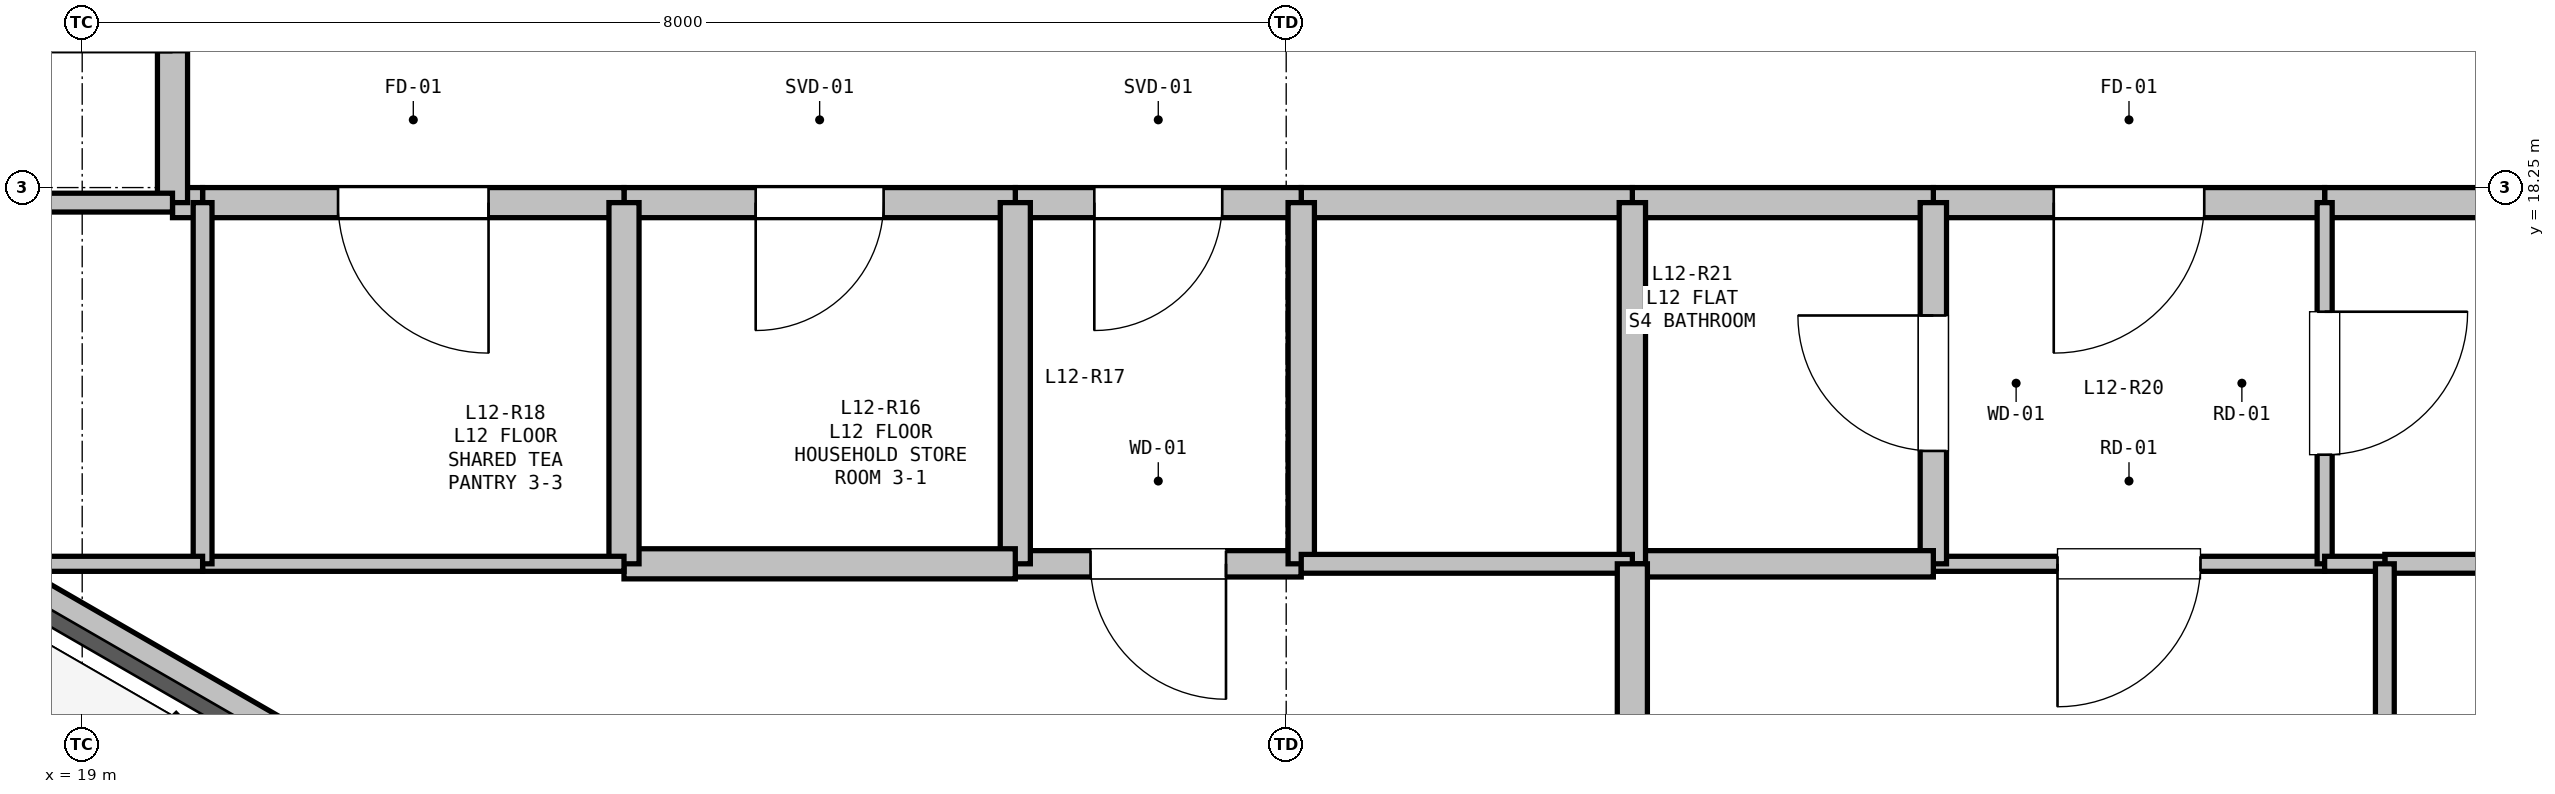
"""IFC4 building model, lengths in metres.
Left out: names, types, materials, properties, quantities, classifications, styles, units other than length and angle.
Written with IfcOpenShell. Run it as: python <this file> out.ifc"""

import sys

from ifc_helpers import new_model, si_unit, direction, frame, frame_2d, origin, place, context, subcontext, project, spatial, rectangle, extrude, element, fill, save


model = new_model("IFC4")
c1 = context("Model", 3, precision=1e-05, world=origin(), true_north=direction((0.0, 1.0)))
c2 = subcontext(c1, "Body", "Model", "MODEL_VIEW")
j1 = project(units=[si_unit("LENGTHUNIT", "METRE"), si_unit("PLANEANGLEUNIT", "RADIAN")], contexts=[c1])
p1 = place(None, origin())
s1 = spatial("IfcSite", under=j1, at=p1, CompositionType="ELEMENT")
p2 = place(p1, origin())
s2 = spatial("IfcBuilding", under=s1, at=p2, CompositionType="ELEMENT")
p3 = place(p2, frame((0.0, 0.0, 45.6)))
s3 = spatial("IfcBuildingStorey", under=s2, at=p3, CompositionType="ELEMENT", Elevation=45.6)
p4 = place(p3, frame((26.76, 10.896, 0.0), z_axis=(0.0, 0.0, 1.0), x_axis=(-0.866027351828, 0.499996625875, 0.0)))
e1 = element("IfcWall", 1, at=p4, inside=s3, PredefinedType="PARAPET", context=c2, shape_type="SweptSolid", body=[
    extrude(rectangle(XDim=11.973, YDim=0.2, at=frame_2d((5.987, 0.0))), origin(), (0.0, 0.0, 1.0), 0.2),
])
p5 = place(p3, frame((35.8, 18.15, 0.0), z_axis=(0.0, 0.0, 1.0), x_axis=(-1.0, 0.0, 0.0)))
e2 = element("IfcWall", 2, at=p5, inside=s3, PredefinedType="PARTITIONING", context=c2, shape_type="SweptSolid", body=[
    extrude(rectangle(XDim=1.9, YDim=0.2, at=frame_2d((0.95, 0.0))), origin(), (0.0, 0.0, 1.0), 3.04),
])
p6 = place(p3, frame((33.9, 18.15, 0.0), z_axis=(0.0, 0.0, 1.0), x_axis=(-1.0, 0.0, 0.0)))
e3 = element("IfcWall", 3, at=p6, inside=s3, PredefinedType="PARTITIONING", context=c2, shape_type="SweptSolid", body=[
    extrude(rectangle(XDim=2.6, YDim=0.2, at=frame_2d((1.3, 0.0))), origin(), (0.0, 0.0, 1.0), 3.04),
])
p7 = place(p6, frame((0.8, 0.0, 0.0)))
e4 = element("IfcOpeningElement", 4, at=p7, cuts=e3, PredefinedType="OPENING", context=c2, shape_type="SweptSolid", body=[
    extrude(rectangle(XDim=1.0, YDim=2.15, at=frame_2d((0.5, 1.075))), frame((0.0, 0.11, 0.0), z_axis=(0.0, -1.0, 0.0), x_axis=(1.0, 0.0, 0.0)), (0.0, 0.0, 1.0), 0.22),
])
p8 = place(p3, frame((31.3, 18.15, 0.0), z_axis=(0.0, 0.0, 1.0), x_axis=(-1.0, 0.0, 0.0)))
e5 = element("IfcWall", 5, at=p8, inside=s3, PredefinedType="PARTITIONING", context=c2, shape_type="SweptSolid", body=[
    extrude(rectangle(XDim=2.0, YDim=0.2, at=frame_2d((1.0, 0.0))), origin(), (0.0, 0.0, 1.0), 3.04),
])
p9 = place(p3, frame((29.3, 18.15, 0.0), z_axis=(0.0, 0.0, 1.0), x_axis=(-1.0, 0.0, 0.0)))
e6 = element("IfcWall", 6, at=p9, inside=s3, PredefinedType="PARTITIONING", context=c2, shape_type="SweptSolid", body=[
    extrude(rectangle(XDim=2.2, YDim=0.2, at=frame_2d((1.1, 0.0))), origin(), (0.0, 0.0, 1.0), 3.04),
])
p10 = place(p3, frame((27.1, 18.15, 0.0), z_axis=(0.0, 0.0, 1.0), x_axis=(-1.0, 0.0, 0.0)))
e7 = element("IfcWall", 7, at=p10, inside=s3, PredefinedType="PARTITIONING", context=c2, shape_type="SweptSolid", body=[
    extrude(rectangle(XDim=1.9, YDim=0.2, at=frame_2d((0.95, 0.0))), origin(), (0.0, 0.0, 1.0), 3.04),
])
p11 = place(p10, frame((0.525, 0.0, 0.0)))
e8 = element("IfcOpeningElement", 8, at=p11, cuts=e7, PredefinedType="OPENING", context=c2, shape_type="SweptSolid", body=[
    extrude(rectangle(XDim=0.85, YDim=2.1, at=frame_2d((0.425, 1.05))), frame((0.0, 0.11, 0.0), z_axis=(0.0, -1.0, 0.0), x_axis=(1.0, 0.0, 0.0)), (0.0, 0.0, 1.0), 0.22),
])
p12 = place(p3, frame((25.2, 18.15, 0.0), z_axis=(0.0, 0.0, 1.0), x_axis=(-1.0, 0.0, 0.0)))
e9 = element("IfcWall", 9, at=p12, inside=s3, PredefinedType="PARTITIONING", context=c2, shape_type="SweptSolid", body=[
    extrude(rectangle(XDim=2.6, YDim=0.2, at=frame_2d((1.3, 0.0))), origin(), (0.0, 0.0, 1.0), 2.337),
])
p13 = place(p12, frame((0.875, 0.0, 0.0)))
e10 = element("IfcOpeningElement", 10, at=p13, cuts=e9, PredefinedType="OPENING", context=c2, shape_type="SweptSolid", body=[
    extrude(rectangle(XDim=0.85, YDim=2.1, at=frame_2d((0.425, 1.05))), frame((0.0, 0.11, 0.0), z_axis=(0.0, -1.0, 0.0), x_axis=(1.0, 0.0, 0.0)), (0.0, 0.0, 1.0), 0.22),
])
p14 = place(p3, frame((22.6, 18.15, 0.0), z_axis=(0.0, 0.0, 1.0), x_axis=(-1.0, 0.0, 0.0)))
e11 = element("IfcWall", 11, at=p14, inside=s3, PredefinedType="PARTITIONING", context=c2, shape_type="SweptSolid", body=[
    extrude(rectangle(XDim=2.8, YDim=0.2, at=frame_2d((1.4, 0.0))), origin(), (0.0, 0.0, 1.0), 3.04),
])
p15 = place(p14, frame((0.9, 0.0, 0.0)))
e12 = element("IfcOpeningElement", 12, at=p15, cuts=e11, PredefinedType="OPENING", context=c2, shape_type="SweptSolid", body=[
    extrude(rectangle(XDim=1.0, YDim=2.15, at=frame_2d((0.5, 1.075))), frame((0.0, 0.11, 0.0), z_axis=(0.0, -1.0, 0.0), x_axis=(1.0, 0.0, 0.0)), (0.0, 0.0, 1.0), 0.22),
])
p16 = place(p3, frame((19.8, 18.15, 0.0), z_axis=(0.0, 0.0, 1.0), x_axis=(-1.0, 0.0, 0.0)))
e13 = element("IfcWall", 13, at=p16, inside=s3, PredefinedType="PARTITIONING", context=c2, shape_type="SweptSolid", body=[
    extrude(rectangle(XDim=0.2, YDim=0.2, at=frame_2d((0.1, 0.0))), origin(), (0.0, 0.0, 1.0), 3.04),
])
p17 = place(p3, frame((19.6, 18.15, 0.0), z_axis=(0.0, 0.0, 1.0), x_axis=(0.0, 1.0, 0.0)))
e14 = element("IfcWall", 14, at=p17, inside=s3, PredefinedType="PARTITIONING", context=c2, shape_type="SweptSolid", body=[
    extrude(rectangle(XDim=3.0, YDim=0.2, at=frame_2d((1.5, 0.0))), origin(), (0.0, 0.0, 1.0), 2.337),
])
p18 = place(p17, frame((1.0, 0.0, 0.0)))
e15 = element("IfcOpeningElement", 15, at=p18, cuts=e14, PredefinedType="OPENING", context=c2, shape_type="SweptSolid", body=[
    extrude(rectangle(XDim=1.0, YDim=2.15, at=frame_2d((0.5, 1.075))), frame((0.0, 0.11, 0.0), z_axis=(0.0, -1.0, 0.0), x_axis=(1.0, 0.0, 0.0)), (0.0, 0.0, 1.0), 0.22),
])
p19 = place(p3, frame((33.9, 15.75, 0.0), z_axis=(0.0, 0.0, 1.0), x_axis=(-1.0, 0.0, 0.0)))
e16 = element("IfcWall", 16, at=p19, inside=s3, PredefinedType="PARTITIONING", context=c2, shape_type="SweptSolid", body=[
    extrude(rectangle(XDim=2.6, YDim=0.1, at=frame_2d((1.3, 0.0))), origin(), (0.0, 0.0, 1.0), 3.04),
])
p20 = place(p19, frame((0.825, 0.0, 0.0)))
e17 = element("IfcOpeningElement", 17, at=p20, cuts=e16, PredefinedType="OPENING", context=c2, shape_type="SweptSolid", body=[
    extrude(rectangle(XDim=0.95, YDim=2.1, at=frame_2d((0.475, 1.05))), frame((0.0, 0.06, 0.0), z_axis=(0.0, -1.0, 0.0), x_axis=(1.0, 0.0, 0.0)), (0.0, 0.0, 1.0), 0.12),
])
p21 = place(p3, frame((31.3, 15.75, 0.0), z_axis=(0.0, 0.0, 1.0), x_axis=(0.0, 1.0, 0.0)))
e18 = element("IfcWall", 18, at=p21, inside=s3, PredefinedType="PLUMBINGWALL", context=c2, shape_type="SweptSolid", body=[
    extrude(rectangle(XDim=2.4, YDim=0.175, at=frame_2d((1.2, 0.0))), origin(), (0.0, 0.0, 1.0), 3.04),
])
p22 = place(p21, frame((0.75, 0.0, 0.0)))
e19 = element("IfcOpeningElement", 19, at=p22, cuts=e18, PredefinedType="OPENING", context=c2, shape_type="SweptSolid", body=[
    extrude(rectangle(XDim=0.9, YDim=2.1, at=frame_2d((0.45, 1.05))), frame((0.0, 0.097, 0.0), z_axis=(0.0, -1.0, 0.0), x_axis=(1.0, 0.0, 0.0)), (0.0, 0.0, 1.0), 0.195),
])
p23 = place(p3, frame((33.9, 18.15, 0.0), z_axis=(0.0, 0.0, 1.0), x_axis=(0.0, -1.0, 0.0)))
e20 = element("IfcWall", 20, at=p23, inside=s3, PredefinedType="PARTITIONING", context=c2, shape_type="SweptSolid", body=[
    extrude(rectangle(XDim=2.4, YDim=0.1, at=frame_2d((1.2, 0.0))), origin(), (0.0, 0.0, 1.0), 3.04),
])
p24 = place(p23, frame((0.725, 0.0, 0.0)))
e21 = element("IfcOpeningElement", 21, at=p24, cuts=e20, PredefinedType="OPENING", context=c2, shape_type="SweptSolid", body=[
    extrude(rectangle(XDim=0.95, YDim=2.1, at=frame_2d((0.475, 1.05))), frame((0.0, 0.06, 0.0), z_axis=(0.0, -1.0, 0.0), x_axis=(1.0, 0.0, 0.0)), (0.0, 0.0, 1.0), 0.12),
])
p25 = place(p3, frame((27.1, 15.75, 0.0), z_axis=(0.0, 0.0, 1.0), x_axis=(-1.0, 0.0, 0.0)))
e22 = element("IfcWall", 22, at=p25, inside=s3, PredefinedType="PLUMBINGWALL", context=c2, shape_type="SweptSolid", body=[
    extrude(rectangle(XDim=1.9, YDim=0.175, at=frame_2d((0.95, 0.0))), origin(), (0.0, 0.0, 1.0), 2.337),
])
p26 = place(p25, frame((0.5, 0.0, 0.0)))
e23 = element("IfcOpeningElement", 23, at=p26, cuts=e22, PredefinedType="OPENING", context=c2, shape_type="SweptSolid", body=[
    extrude(rectangle(XDim=0.9, YDim=2.1, at=frame_2d((0.45, 1.05))), frame((0.0, 0.097, 0.0), z_axis=(0.0, -1.0, 0.0), x_axis=(1.0, 0.0, 0.0)), (0.0, 0.0, 1.0), 0.195),
])
p27 = place(p3, frame((25.2, 15.75, 0.0), z_axis=(0.0, 0.0, 1.0), x_axis=(0.0, 1.0, 0.0)))
e24 = element("IfcWall", 24, at=p27, inside=s3, PredefinedType="PARTITIONING", context=c2, shape_type="SweptSolid", body=[
    extrude(rectangle(XDim=2.4, YDim=0.2, at=frame_2d((1.2, 0.0))), origin(), (0.0, 0.0, 1.0), 2.337),
])
p28 = place(p3, frame((27.1, 18.15, 0.0), z_axis=(0.0, 0.0, 1.0), x_axis=(0.0, -1.0, 0.0)))
e25 = element("IfcWall", 25, at=p28, inside=s3, PredefinedType="PLUMBINGWALL", context=c2, shape_type="SweptSolid", body=[
    extrude(rectangle(XDim=2.4, YDim=0.175, at=frame_2d((1.2, 0.0))), origin(), (0.0, 0.0, 1.0), 3.04),
])
p29 = place(p3, frame((31.3, 15.75, 0.0), z_axis=(0.0, 0.0, 1.0), x_axis=(-1.0, 0.0, 0.0)))
e26 = element("IfcWall", 26, at=p29, inside=s3, PredefinedType="PLUMBINGWALL", context=c2, shape_type="SweptSolid", body=[
    extrude(rectangle(XDim=2.0, YDim=0.175, at=frame_2d((1.0, 0.0))), origin(), (0.0, 0.0, 1.0), 3.04),
])
p30 = place(p3, frame((29.3, 15.75, 0.0), z_axis=(0.0, 0.0, 1.0), x_axis=(0.0, 1.0, 0.0)))
e27 = element("IfcWall", 27, at=p30, inside=s3, PredefinedType="PLUMBINGWALL", context=c2, shape_type="SweptSolid", body=[
    extrude(rectangle(XDim=2.4, YDim=0.175, at=frame_2d((1.2, 0.0))), origin(), (0.0, 0.0, 1.0), 3.04),
])
p31 = place(p3, frame((43.688, 15.75, 0.0), z_axis=(0.0, 0.0, 1.0), x_axis=(-1.0, 0.0, 0.0)))
e28 = element("IfcWall", 28, at=p31, inside=s3, PredefinedType="PARTITIONING", context=c2, shape_type="SweptSolid", body=[
    extrude(rectangle(XDim=9.388, YDim=0.125, at=frame_2d((4.694, 0.0))), origin(), (0.0, 0.0, 1.0), 2.337),
])
p32 = place(p31, frame((4.219, 0.0, 0.0)))
e29 = element("IfcOpeningElement", 29, at=p32, cuts=e28, PredefinedType="OPENING", context=c2, shape_type="SweptSolid", body=[
    extrude(rectangle(XDim=0.95, YDim=2.1, at=frame_2d((0.475, 1.05))), frame((0.0, 0.073, 0.0), z_axis=(0.0, -1.0, 0.0), x_axis=(1.0, 0.0, 0.0)), (0.0, 0.0, 1.0), 0.145),
])
p33 = place(p3, frame((34.3, 15.75, 0.0), z_axis=(0.0, 0.0, 1.0), x_axis=(-1.0, 0.0, 0.0)))
e30 = element("IfcWall", 30, at=p33, inside=s3, PredefinedType="PARTITIONING", context=c2, shape_type="SweptSolid", body=[
    extrude(rectangle(XDim=0.4, YDim=0.1, at=frame_2d((0.2, 0.0))), origin(), (0.0, 0.0, 1.0), 3.04),
])
p34 = place(p3, frame((19.6, 18.15, 0.0), z_axis=(0.0, 0.0, 1.0), x_axis=(-1.0, 0.0, 0.0)))
e31 = element("IfcWall", 31, at=p34, inside=s3, PredefinedType="PARTITIONING", context=c2, shape_type="SweptSolid", body=[
    extrude(rectangle(XDim=2.45, YDim=0.125, at=frame_2d((1.225, 0.0))), origin(), (0.0, 0.0, 1.0), 3.04),
])
p35 = place(p3, frame((25.2, 15.75, 0.0), z_axis=(0.0, 0.0, 1.0), x_axis=(-1.0, 0.0, 0.0)))
e32 = element("IfcWall", 32, at=p35, inside=s3, PredefinedType="PARTITIONING", context=c2, shape_type="SweptSolid", body=[
    extrude(rectangle(XDim=2.6, YDim=0.2, at=frame_2d((1.3, 0.0))), origin(), (0.0, 0.0, 1.0), 3.04),
])
p36 = place(p3, frame((22.6, 15.75, 0.0), z_axis=(0.0, 0.0, 1.0), x_axis=(0.0, 1.0, 0.0)))
e33 = element("IfcWall", 33, at=p36, inside=s3, PredefinedType="PARTITIONING", context=c2, shape_type="SweptSolid", body=[
    extrude(rectangle(XDim=2.4, YDim=0.2, at=frame_2d((1.2, 0.0))), origin(), (0.0, 0.0, 1.0), 3.04),
])
p37 = place(p3, frame((22.6, 15.75, 0.0), z_axis=(0.0, 0.0, 1.0), x_axis=(-1.0, 0.0, 0.0)))
e34 = element("IfcWall", 34, at=p37, inside=s3, PredefinedType="PARTITIONING", context=c2, shape_type="SweptSolid", body=[
    extrude(rectangle(XDim=2.8, YDim=0.1, at=frame_2d((1.4, 0.0))), origin(), (0.0, 0.0, 1.0), 2.65),
])
p38 = place(p3, frame((19.8, 15.75, 0.0), z_axis=(0.0, 0.0, 1.0), x_axis=(0.0, 1.0, 0.0)))
e35 = element("IfcWall", 35, at=p38, inside=s3, PredefinedType="PARTITIONING", context=c2, shape_type="SweptSolid", body=[
    extrude(rectangle(XDim=2.4, YDim=0.125, at=frame_2d((1.2, 0.0))), origin(), (0.0, 0.0, 1.0), 2.65),
])
p39 = place(p3, frame((18.418, 15.75, 0.0), z_axis=(0.0, 0.0, 1.0), x_axis=(1.0, 0.0, 0.0)))
e36 = element("IfcWall", 36, at=p39, inside=s3, PredefinedType="PARTITIONING", context=c2, shape_type="SweptSolid", body=[
    extrude(rectangle(XDim=1.382, YDim=0.1, at=frame_2d((0.691, 0.0))), origin(), (0.0, 0.0, 1.0), 2.365),
])
p40 = place(p3, frame((27.1, 15.75, 0.0), z_axis=(0.0, 0.0, 1.0), x_axis=(1.0, 0.0, 0.0)))
e37 = element("IfcWall", 37, at=p40, inside=s3, PredefinedType="PARTITIONING", context=c2, shape_type="SweptSolid", body=[
    extrude(rectangle(XDim=2.2, YDim=0.125, at=frame_2d((1.1, 0.0))), origin(), (0.0, 0.0, 1.0), 3.04),
])
p41 = place(p3, frame((29.3, 15.75, 0.0), z_axis=(0.0, 0.0, 1.0), x_axis=(0.0, -1.0, 0.0)))
e38 = element("IfcWall", 38, at=p41, inside=s3, PredefinedType="PARTITIONING", context=c2, shape_type="SweptSolid", body=[
    extrude(rectangle(XDim=6.134, YDim=0.2, at=frame_2d((3.067, 0.0))), origin(), (0.0, 0.0, 1.0), 2.337),
])
p42 = place(p3, frame((34.3, 15.75, 0.0), z_axis=(0.0, 0.0, 1.0), x_axis=(0.0, -1.0, 0.0)))
e39 = element("IfcWall", 39, at=p42, inside=s3, PredefinedType="PARTITIONING", context=c2, shape_type="SweptSolid", body=[
    extrude(rectangle(XDim=6.06, YDim=0.125, at=frame_2d((3.03, 0.0))), origin(), (0.0, 0.0, 1.0), 3.04),
])
p43 = place(p42, frame((2.555, 0.0, 0.0)))
e40 = element("IfcOpeningElement", 40, at=p43, cuts=e39, PredefinedType="OPENING", context=c2, shape_type="SweptSolid", body=[
    extrude(rectangle(XDim=0.95, YDim=2.1, at=frame_2d((0.475, 1.05))), frame((0.0, 0.073, 0.0), z_axis=(0.0, -1.0, 0.0), x_axis=(1.0, 0.0, 0.0)), (0.0, 0.0, 1.0), 0.145),
])
p44 = place(p7, origin())
e41 = element("IfcDoor", 41, at=p44, inside=s3, OperationType="SINGLE_SWING_RIGHT", PredefinedType="DOOR", context=c2, shape_type="SweptSolid", body=[
    extrude(rectangle(XDim=1.0, YDim=2.15, at=frame_2d((0.5, 1.075))), frame((0.0, 0.025, 0.0), z_axis=(0.0, -1.0, 0.0), x_axis=(1.0, 0.0, 0.0)), (0.0, 0.0, 1.0), 0.05),
])
fill(e4, e41)
p45 = place(p11, origin())
e42 = element("IfcDoor", 42, at=p45, inside=s3, OperationType="SINGLE_SWING_RIGHT", PredefinedType="DOOR", context=c2, shape_type="SweptSolid", body=[
    extrude(rectangle(XDim=0.85, YDim=2.1, at=frame_2d((0.425, 1.05))), frame((0.0, 0.025, 0.0), z_axis=(0.0, -1.0, 0.0), x_axis=(1.0, 0.0, 0.0)), (0.0, 0.0, 1.0), 0.05),
])
fill(e8, e42)
p46 = place(p13, origin())
e43 = element("IfcDoor", 43, at=p46, inside=s3, OperationType="SINGLE_SWING_RIGHT", PredefinedType="DOOR", context=c2, shape_type="SweptSolid", body=[
    extrude(rectangle(XDim=0.85, YDim=2.1, at=frame_2d((0.425, 1.05))), frame((0.0, 0.025, 0.0), z_axis=(0.0, -1.0, 0.0), x_axis=(1.0, 0.0, 0.0)), (0.0, 0.0, 1.0), 0.05),
])
fill(e10, e43)
p47 = place(p15, origin())
e44 = element("IfcDoor", 44, at=p47, inside=s3, OperationType="SINGLE_SWING_LEFT", PredefinedType="DOOR", context=c2, shape_type="SweptSolid", body=[
    extrude(rectangle(XDim=1.0, YDim=2.15, at=frame_2d((0.5, 1.075))), frame((0.0, 0.025, 0.0), z_axis=(0.0, -1.0, 0.0), x_axis=(1.0, 0.0, 0.0)), (0.0, 0.0, 1.0), 0.05),
])
fill(e12, e44)
p48 = place(p22, origin())
e45 = element("IfcDoor", 45, at=p48, inside=s3, OperationType="SINGLE_SWING_RIGHT", PredefinedType="DOOR", context=c2, shape_type="SweptSolid", body=[
    extrude(rectangle(XDim=0.9, YDim=2.1, at=frame_2d((0.45, 1.05))), frame((0.0, 0.025, 0.0), z_axis=(0.0, -1.0, 0.0), x_axis=(1.0, 0.0, 0.0)), (0.0, 0.0, 1.0), 0.05),
])
fill(e19, e45)
p49 = place(p24, origin())
e46 = element("IfcDoor", 46, at=p49, inside=s3, OperationType="SINGLE_SWING_LEFT", PredefinedType="DOOR", context=c2, shape_type="SweptSolid", body=[
    extrude(rectangle(XDim=0.95, YDim=2.1, at=frame_2d((0.475, 1.05))), frame((0.0, 0.025, 0.0), z_axis=(0.0, -1.0, 0.0), x_axis=(1.0, 0.0, 0.0)), (0.0, 0.0, 1.0), 0.05),
])
fill(e21, e46)
p50 = place(p20, origin())
e47 = element("IfcDoor", 47, at=p50, inside=s3, OperationType="SINGLE_SWING_RIGHT", PredefinedType="DOOR", context=c2, shape_type="SweptSolid", body=[
    extrude(rectangle(XDim=0.95, YDim=2.1, at=frame_2d((0.475, 1.05))), frame((0.0, 0.025, 0.0), z_axis=(0.0, -1.0, 0.0), x_axis=(1.0, 0.0, 0.0)), (0.0, 0.0, 1.0), 0.05),
])
fill(e17, e47)
p51 = place(p26, origin())
e48 = element("IfcDoor", 48, at=p51, inside=s3, OperationType="SINGLE_SWING_LEFT", PredefinedType="DOOR", context=c2, shape_type="SweptSolid", body=[
    extrude(rectangle(XDim=0.9, YDim=2.1, at=frame_2d((0.45, 1.05))), frame((0.0, 0.025, 0.0), z_axis=(0.0, -1.0, 0.0), x_axis=(1.0, 0.0, 0.0)), (0.0, 0.0, 1.0), 0.05),
])
fill(e23, e48)
save(model, sys.argv[1])
